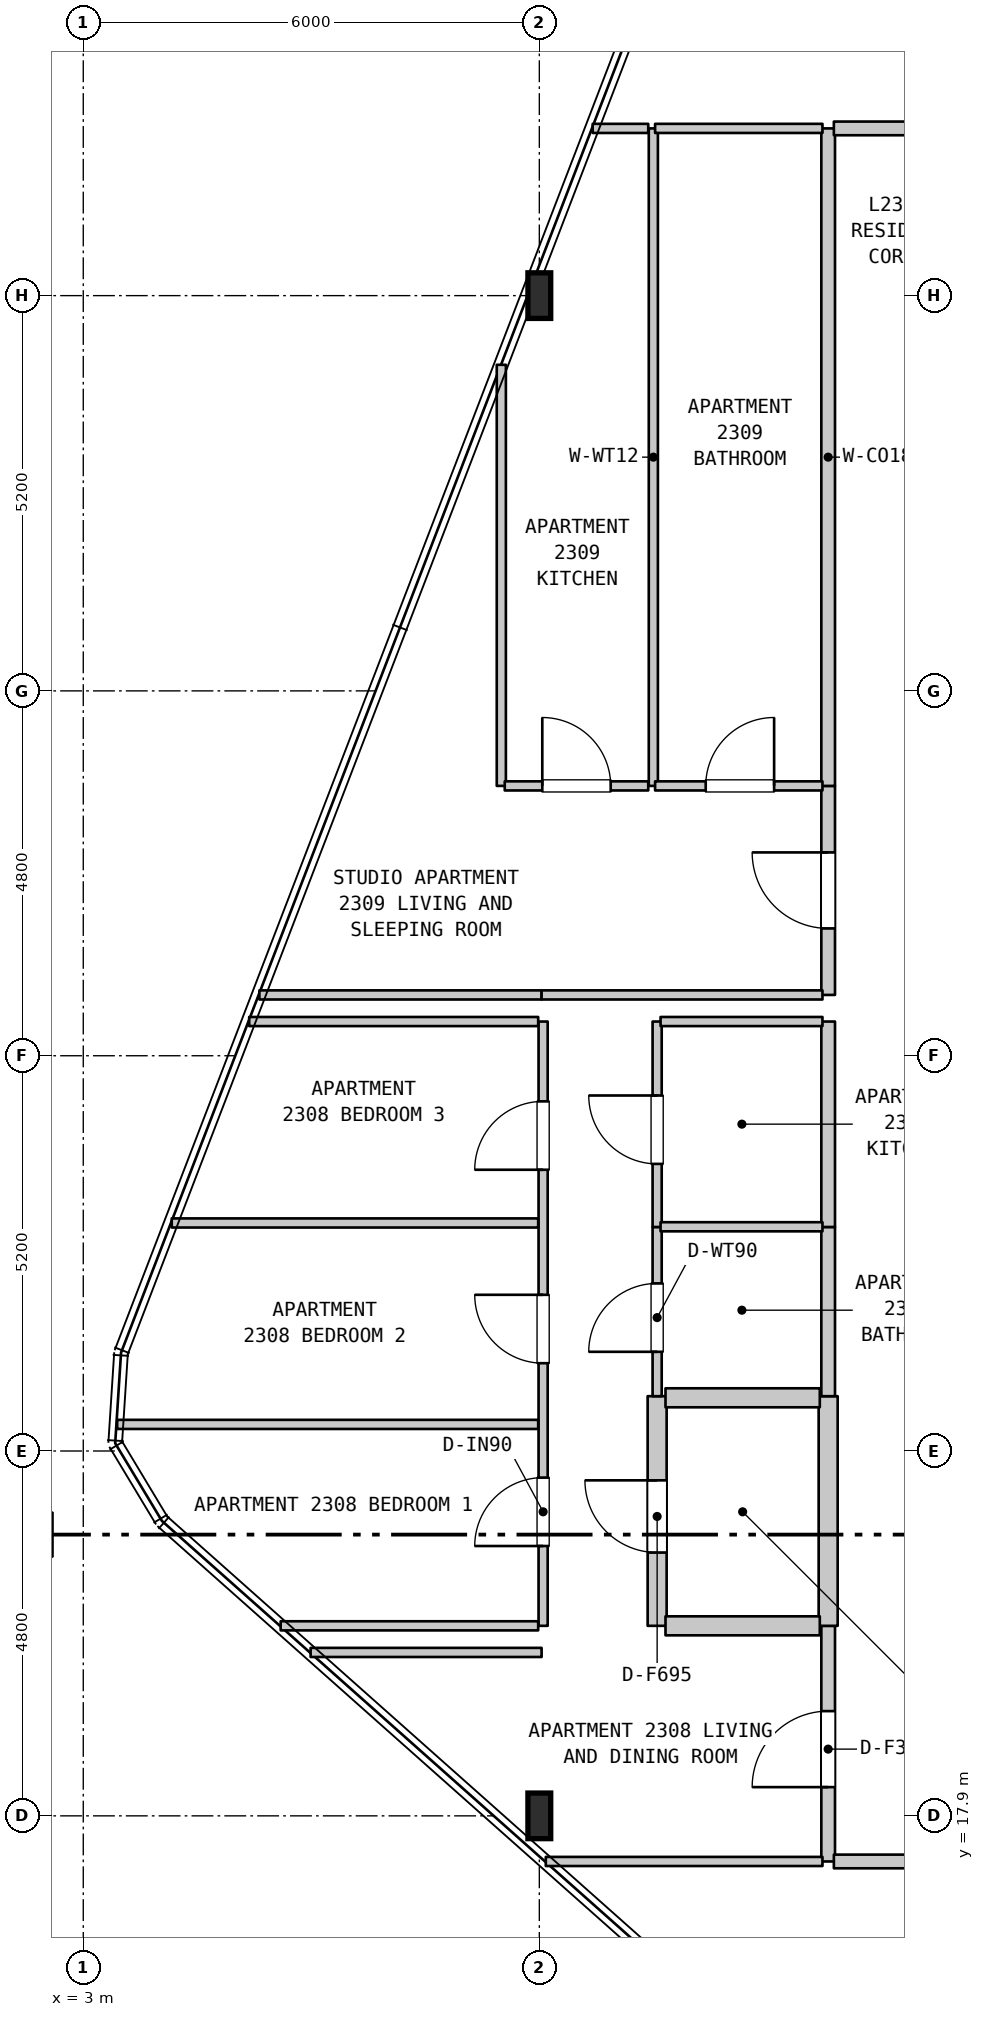
"""IFC4 building model, lengths in metres.
Left out: names, types, materials, properties, quantities, classifications, styles, units other than length and angle.
Written with IfcOpenShell. Run it as: python <this file> out.ifc"""

import sys

from ifc_helpers import new_model, si_unit, direction, frame, frame_2d, origin, origin_2d, place, context, subcontext, project, spatial, rectangle, i_section, extrude, element, fill, save


model = new_model("IFC4")
c1 = context("Model", 3, precision=1e-05, world=origin(), true_north=direction((0.0, 1.0)))
c2 = subcontext(c1, "Body", "Model", "MODEL_VIEW")
j1 = project(units=[si_unit("LENGTHUNIT", "METRE"), si_unit("PLANEANGLEUNIT", "RADIAN")], contexts=[c1])
p1 = place(None, origin())
s1 = spatial("IfcSite", under=j1, at=p1, CompositionType="ELEMENT")
p2 = place(p1, origin())
s2 = spatial("IfcBuilding", under=s1, at=p2, CompositionType="ELEMENT")
p3 = place(p2, frame((0.0, 0.0, 98.3)))
s3 = spatial("IfcBuildingStorey", under=s2, at=p3, CompositionType="ELEMENT", Elevation=98.3)
for number, where, z_axis, x_axis in (
    (1, (9.0, 17.9, 0.0), (0.0, 0.0, 1.0), (1.0, 0.0, 0.0)),
    (2, (9.0, 37.9, 0.0), (0.0, 0.0, 1.0), (1.0, 0.0, 0.0)),
):
    element("IfcColumn", number, at=place(p3, frame(where, z_axis=z_axis, x_axis=x_axis)), inside=s3, PredefinedType="COLUMN", context=c2, shape_type="SweptSolid", body=[
        extrude(i_section(OverallWidth=0.3, OverallDepth=0.6, WebThickness=0.015, FlangeThickness=0.03, FilletRadius=0.027, at=origin_2d()), origin(), (0.0, 0.0, 1.0), 3.7),
    ])
p4 = place(p3, frame((8.5, 31.45, 0.0), z_axis=(0.0, 0.0, 1.0), x_axis=(0.0, 1.0, 0.0)))
e3 = element("IfcWall", 3, at=p4, inside=s3, PredefinedType="PARTITIONING", context=c2, shape_type="SweptSolid", body=[
    extrude(rectangle(XDim=5.54, YDim=0.12, at=frame_2d((2.77, 0.0))), origin(), (0.0, 0.0, 1.0), 3.385),
])
p5 = place(p3, frame((9.05, 20.4, 0.0), z_axis=(0.0, 0.0, 1.0), x_axis=(0.0, 1.0, 0.0)))
e4 = element("IfcWall", 4, at=p5, inside=s3, PredefinedType="PARTITIONING", context=c2, shape_type="SweptSolid", body=[
    extrude(rectangle(XDim=7.95, YDim=0.12, at=frame_2d((3.975, 0.0))), origin(), (0.0, 0.0, 1.0), 2.785),
])
p6 = place(p5, frame((1.05, 0.0, 0.0)))
e5 = element("IfcOpeningElement", 5, at=p6, cuts=e4, PredefinedType="OPENING", context=c2, shape_type="SweptSolid", body=[
    extrude(rectangle(XDim=0.9, YDim=2.15, at=frame_2d((0.45, 1.075))), frame((0.0, 0.07, 0.0), z_axis=(0.0, -1.0, 0.0), x_axis=(1.0, 0.0, 0.0)), (0.0, 0.0, 1.0), 0.14),
])
p7 = place(p5, frame((3.455, 0.0, 0.0)))
e6 = element("IfcOpeningElement", 6, at=p7, cuts=e4, PredefinedType="OPENING", context=c2, shape_type="SweptSolid", body=[
    extrude(rectangle(XDim=0.9, YDim=2.15, at=frame_2d((0.45, 1.075))), frame((0.0, 0.07, 0.0), z_axis=(0.0, -1.0, 0.0), x_axis=(1.0, 0.0, 0.0)), (0.0, 0.0, 1.0), 0.14),
])
p8 = place(p5, frame((6.0, 0.0, 0.0)))
e7 = element("IfcOpeningElement", 7, at=p8, cuts=e4, PredefinedType="OPENING", context=c2, shape_type="SweptSolid", body=[
    extrude(rectangle(XDim=0.9, YDim=2.15, at=frame_2d((0.45, 1.075))), frame((0.0, 0.07, 0.0), z_axis=(0.0, -1.0, 0.0), x_axis=(1.0, 0.0, 0.0)), (0.0, 0.0, 1.0), 0.14),
])
p9 = place(p3, frame((10.5, 31.45, 0.0), z_axis=(0.0, 0.0, 1.0), x_axis=(0.0, 1.0, 0.0)))
e8 = element("IfcWall", 8, at=p9, inside=s3, PredefinedType="PARTITIONING", context=c2, shape_type="SweptSolid", body=[
    extrude(rectangle(XDim=8.65, YDim=0.12, at=frame_2d((4.325, 0.0))), origin(), (0.0, 0.0, 1.0), 3.385),
])
p10 = place(p3, frame((10.55, 20.4, 0.0), z_axis=(0.0, 0.0, 1.0), x_axis=(0.0, 1.0, 0.0)))
e9 = element("IfcWall", 9, at=p10, inside=s3, PredefinedType="STANDARD", context=c2, shape_type="SweptSolid", body=[
    extrude(rectangle(XDim=3.021, YDim=0.25, at=frame_2d((1.51, 0.0))), origin(), (0.0, 0.0, 1.0), 3.385),
])
p11 = place(p10, frame((0.964, 0.0, 0.0)))
e10 = element("IfcOpeningElement", 10, at=p11, cuts=e9, PredefinedType="OPENING", context=c2, shape_type="SweptSolid", body=[
    extrude(rectangle(XDim=0.95, YDim=2.15, at=frame_2d((0.475, 1.075))), frame((0.0, 0.135, 0.0), z_axis=(0.0, -1.0, 0.0), x_axis=(1.0, 0.0, 0.0)), (0.0, 0.0, 1.0), 0.27),
])
p12 = place(p3, frame((10.55, 23.421, 0.0), z_axis=(0.0, 0.0, 1.0), x_axis=(0.0, 1.0, 0.0)))
e11 = element("IfcWall", 11, at=p12, inside=s3, PredefinedType="PARTITIONING", context=c2, shape_type="SweptSolid", body=[
    extrude(rectangle(XDim=2.226, YDim=0.12, at=frame_2d((1.113, 0.0))), origin(), (0.0, 0.0, 1.0), 3.385),
])
p13 = place(p12, frame((0.584, 0.0, 0.0)))
e12 = element("IfcOpeningElement", 12, at=p13, cuts=e11, PredefinedType="OPENING", context=c2, shape_type="SweptSolid", body=[
    extrude(rectangle(XDim=0.9, YDim=2.1, at=frame_2d((0.45, 1.05))), frame((0.0, 0.07, 0.0), z_axis=(0.0, -1.0, 0.0), x_axis=(1.0, 0.0, 0.0)), (0.0, 0.0, 1.0), 0.14),
])
p14 = place(p3, frame((10.55, 25.647, 0.0), z_axis=(0.0, 0.0, 1.0), x_axis=(0.0, 1.0, 0.0)))
e13 = element("IfcWall", 13, at=p14, inside=s3, PredefinedType="PARTITIONING", context=c2, shape_type="SweptSolid", body=[
    extrude(rectangle(XDim=2.703, YDim=0.12, at=frame_2d((1.352, 0.0))), origin(), (0.0, 0.0, 1.0), 3.385),
])
p15 = place(p14, frame((0.83, 0.0, 0.0)))
e14 = element("IfcOpeningElement", 14, at=p15, cuts=e13, PredefinedType="OPENING", context=c2, shape_type="SweptSolid", body=[
    extrude(rectangle(XDim=0.9, YDim=2.15, at=frame_2d((0.45, 1.075))), frame((0.0, 0.07, 0.0), z_axis=(0.0, -1.0, 0.0), x_axis=(1.0, 0.0, 0.0)), (0.0, 0.0, 1.0), 0.14),
])
p16 = place(p3, frame((12.8, 17.3, 0.0), z_axis=(0.0, 0.0, 1.0), x_axis=(0.0, 1.0, 0.0)))
e15 = element("IfcWall", 15, at=p16, inside=s3, PredefinedType="STANDARD", context=c2, shape_type="SweptSolid", body=[
    extrude(rectangle(XDim=3.1, YDim=0.18, at=frame_2d((1.55, 0.0))), origin(), (0.0, 0.0, 1.0), 3.385),
])
p17 = place(p16, frame((0.978, 0.0, 0.0)))
e16 = element("IfcOpeningElement", 16, at=p17, cuts=e15, PredefinedType="OPENING", context=c2, shape_type="SweptSolid", body=[
    extrude(rectangle(XDim=1.0, YDim=2.15, at=frame_2d((0.5, 1.075))), frame((0.0, 0.1, 0.0), z_axis=(0.0, -1.0, 0.0), x_axis=(1.0, 0.0, 0.0)), (0.0, 0.0, 1.0), 0.2),
])
p18 = place(p3, frame((12.8, 20.4, 0.0), z_axis=(0.0, 0.0, 1.0), x_axis=(0.0, 1.0, 0.0)))
e17 = element("IfcWall", 17, at=p18, inside=s3, PredefinedType="STANDARD", context=c2, shape_type="SweptSolid", body=[
    extrude(rectangle(XDim=3.021, YDim=0.25, at=frame_2d((1.51, 0.0))), origin(), (0.0, 0.0, 1.0), 3.385),
])
p19 = place(p3, frame((12.8, 23.421, 0.0), z_axis=(0.0, 0.0, 1.0), x_axis=(0.0, 1.0, 0.0)))
e18 = element("IfcWall", 18, at=p19, inside=s3, PredefinedType="STANDARD", context=c2, shape_type="SweptSolid", body=[
    extrude(rectangle(XDim=2.226, YDim=0.18, at=frame_2d((1.113, 0.0))), origin(), (0.0, 0.0, 1.0), 3.385),
])
p20 = place(p3, frame((12.8, 25.647, 0.0), z_axis=(0.0, 0.0, 1.0), x_axis=(0.0, 1.0, 0.0)))
e19 = element("IfcWall", 19, at=p20, inside=s3, PredefinedType="STANDARD", context=c2, shape_type="SweptSolid", body=[
    extrude(rectangle(XDim=2.703, YDim=0.18, at=frame_2d((1.352, 0.0))), origin(), (0.0, 0.0, 1.0), 3.385),
])
p21 = place(p3, frame((12.8, 28.7, 0.0), z_axis=(0.0, 0.0, 1.0), x_axis=(0.0, 1.0, 0.0)))
e20 = element("IfcWall", 20, at=p21, inside=s3, PredefinedType="STANDARD", context=c2, shape_type="SweptSolid", body=[
    extrude(rectangle(XDim=2.75, YDim=0.18, at=frame_2d((1.375, 0.0))), origin(), (0.0, 0.0, 1.0), 3.385),
])
p22 = place(p21, frame((0.875, 0.0, 0.0)))
e21 = element("IfcOpeningElement", 21, at=p22, cuts=e20, PredefinedType="OPENING", context=c2, shape_type="SweptSolid", body=[
    extrude(rectangle(XDim=1.0, YDim=2.15, at=frame_2d((0.5, 1.075))), frame((0.0, 0.1, 0.0), z_axis=(0.0, -1.0, 0.0), x_axis=(1.0, 0.0, 0.0)), (0.0, 0.0, 1.0), 0.2),
])
p23 = place(p3, frame((12.8, 31.45, 0.0), z_axis=(0.0, 0.0, 1.0), x_axis=(0.0, 1.0, 0.0)))
e22 = element("IfcWall", 22, at=p23, inside=s3, PredefinedType="STANDARD", context=c2, shape_type="SweptSolid", body=[
    extrude(rectangle(XDim=8.65, YDim=0.18, at=frame_2d((4.325, 0.0))), origin(), (0.0, 0.0, 1.0), 3.385),
])
p24 = place(p3, frame((9.085, 17.3, 0.0), z_axis=(0.0, 0.0, 1.0), x_axis=(1.0, 0.0, 0.0)))
e23 = element("IfcWall", 23, at=p24, inside=s3, PredefinedType="PARTITIONING", context=c2, shape_type="SweptSolid", body=[
    extrude(rectangle(XDim=3.64, YDim=0.12, at=frame_2d((1.82, 0.0))), origin(), (0.0, 0.0, 1.0), 3.385),
])
p25 = place(p3, frame((12.875, 17.3, 0.0), z_axis=(0.0, 0.0, 1.0), x_axis=(1.0, 0.0, 0.0)))
e24 = element("IfcWall", 24, at=p25, inside=s3, PredefinedType="STANDARD", context=c2, shape_type="SweptSolid", body=[
    extrude(rectangle(XDim=7.35, YDim=0.18, at=frame_2d((3.675, 0.0))), origin(), (0.0, 0.0, 1.0), 3.385),
])
p26 = place(p25, frame((3.16, 0.0, 0.0)))
e25 = element("IfcOpeningElement", 25, at=p26, cuts=e24, PredefinedType="OPENING", context=c2, shape_type="SweptSolid", body=[
    extrude(rectangle(XDim=1.0, YDim=2.15, at=frame_2d((0.5, 1.075))), frame((0.0, 0.1, 0.0), z_axis=(0.0, -1.0, 0.0), x_axis=(1.0, 0.0, 0.0)), (0.0, 0.0, 1.0), 0.2),
])
p27 = place(p3, frame((5.991, 20.05, 0.0), z_axis=(0.0, 0.0, 1.0), x_axis=(1.0, 0.0, 0.0)))
e26 = element("IfcWall", 26, at=p27, inside=s3, PredefinedType="PARTITIONING", context=c2, shape_type="SweptSolid", body=[
    extrude(rectangle(XDim=3.039, YDim=0.12, at=frame_2d((1.52, 0.0))), origin(), (0.0, 0.0, 1.0), 3.385),
])
p28 = place(p3, frame((5.597, 20.4, 0.0), z_axis=(0.0, 0.0, 1.0), x_axis=(1.0, 0.0, 0.0)))
e27 = element("IfcWall", 27, at=p28, inside=s3, PredefinedType="PARTITIONING", context=c2, shape_type="SweptSolid", body=[
    extrude(rectangle(XDim=3.388, YDim=0.12, at=frame_2d((1.694, 0.0))), origin(), (0.0, 0.0, 1.0), 3.385),
])
p29 = place(p3, frame((10.66, 20.4, 0.0), z_axis=(0.0, 0.0, 1.0), x_axis=(1.0, 0.0, 0.0)))
e28 = element("IfcWall", 28, at=p29, inside=s3, PredefinedType="STANDARD", context=c2, shape_type="SweptSolid", body=[
    extrude(rectangle(XDim=2.03, YDim=0.25, at=frame_2d((1.015, 0.0))), origin(), (0.0, 0.0, 1.0), 3.385),
])
p30 = place(p3, frame((3.446, 23.05, 0.0), z_axis=(0.0, 0.0, 1.0), x_axis=(1.0, 0.0, 0.0)))
e29 = element("IfcWall", 29, at=p30, inside=s3, PredefinedType="PARTITIONING", context=c2, shape_type="SweptSolid", body=[
    extrude(rectangle(XDim=5.539, YDim=0.12, at=frame_2d((2.77, 0.0))), origin(), (0.0, 0.0, 1.0), 3.385),
])
p31 = place(p3, frame((10.66, 23.4, 0.0), z_axis=(0.0, 0.0, 1.0), x_axis=(1.0, 0.0, 0.0)))
e30 = element("IfcWall", 30, at=p31, inside=s3, PredefinedType="STANDARD", context=c2, shape_type="SweptSolid", body=[
    extrude(rectangle(XDim=2.03, YDim=0.25, at=frame_2d((1.015, 0.0))), origin(), (0.0, 0.0, 1.0), 3.385),
])
p32 = place(p3, frame((10.595, 25.65, 0.0), z_axis=(0.0, 0.0, 1.0), x_axis=(1.0, 0.0, 0.0)))
e31 = element("IfcWall", 31, at=p32, inside=s3, PredefinedType="PARTITIONING", context=c2, shape_type="SweptSolid", body=[
    extrude(rectangle(XDim=2.13, YDim=0.12, at=frame_2d((1.065, 0.0))), origin(), (0.0, 0.0, 1.0), 3.385),
])
p33 = place(p3, frame((4.164, 25.7, 0.0), z_axis=(0.0, 0.0, 1.0), x_axis=(1.0, 0.0, 0.0)))
e32 = element("IfcWall", 32, at=p33, inside=s3, PredefinedType="PARTITIONING", context=c2, shape_type="SweptSolid", body=[
    extrude(rectangle(XDim=4.821, YDim=0.12, at=frame_2d((2.411, 0.0))), origin(), (0.0, 0.0, 1.0), 3.385),
])
p34 = place(p3, frame((5.183, 28.35, 0.0), z_axis=(0.0, 0.0, 1.0), x_axis=(1.0, 0.0, 0.0)))
e33 = element("IfcWall", 33, at=p34, inside=s3, PredefinedType="PARTITIONING", context=c2, shape_type="SweptSolid", body=[
    extrude(rectangle(XDim=3.802, YDim=0.12, at=frame_2d((1.901, 0.0))), origin(), (0.0, 0.0, 1.0), 3.385),
])
p35 = place(p3, frame((10.595, 28.35, 0.0), z_axis=(0.0, 0.0, 1.0), x_axis=(1.0, 0.0, 0.0)))
e34 = element("IfcWall", 34, at=p35, inside=s3, PredefinedType="PARTITIONING", context=c2, shape_type="SweptSolid", body=[
    extrude(rectangle(XDim=2.13, YDim=0.12, at=frame_2d((1.065, 0.0))), origin(), (0.0, 0.0, 1.0), 3.385),
])
p36 = place(p3, frame((5.317, 28.7, 0.0), z_axis=(0.0, 0.0, 1.0), x_axis=(1.0, 0.0, 0.0)))
e35 = element("IfcWall", 35, at=p36, inside=s3, PredefinedType="PARTITIONING", context=c2, shape_type="SweptSolid", body=[
    extrude(rectangle(XDim=3.713, YDim=0.12, at=frame_2d((1.856, 0.0))), origin(), (0.0, 0.0, 1.0), 3.385),
])
p37 = place(p3, frame((9.03, 28.7, 0.0), z_axis=(0.0, 0.0, 1.0), x_axis=(1.0, 0.0, 0.0)))
e36 = element("IfcWall", 36, at=p37, inside=s3, PredefinedType="PARTITIONING", context=c2, shape_type="SweptSolid", body=[
    extrude(rectangle(XDim=3.695, YDim=0.12, at=frame_2d((1.848, 0.0))), origin(), (0.0, 0.0, 1.0), 3.385),
])
p38 = place(p3, frame((8.545, 31.45, 0.0), z_axis=(0.0, 0.0, 1.0), x_axis=(1.0, 0.0, 0.0)))
e37 = element("IfcWall", 37, at=p38, inside=s3, PredefinedType="PARTITIONING", context=c2, shape_type="SweptSolid", body=[
    extrude(rectangle(XDim=1.888, YDim=0.12, at=frame_2d((0.944, 0.0))), origin(), (0.0, 0.0, 1.0), 3.385),
])
p39 = place(p38, frame((0.494, 0.0, 0.0)))
e38 = element("IfcOpeningElement", 38, at=p39, cuts=e37, PredefinedType="OPENING", context=c2, shape_type="SweptSolid", body=[
    extrude(rectangle(XDim=0.9, YDim=2.15, at=frame_2d((0.45, 1.075))), frame((0.0, 0.07, 0.0), z_axis=(0.0, -1.0, 0.0), x_axis=(1.0, 0.0, 0.0)), (0.0, 0.0, 1.0), 0.14),
])
p40 = place(p3, frame((10.523, 31.45, 0.0), z_axis=(0.0, 0.0, 1.0), x_axis=(1.0, 0.0, 0.0)))
e39 = element("IfcWall", 39, at=p40, inside=s3, PredefinedType="PARTITIONING", context=c2, shape_type="SweptSolid", body=[
    extrude(rectangle(XDim=2.202, YDim=0.12, at=frame_2d((1.101, 0.0))), origin(), (0.0, 0.0, 1.0), 3.385),
])
p41 = place(p40, frame((0.666, 0.0, 0.0)))
e40 = element("IfcOpeningElement", 40, at=p41, cuts=e39, PredefinedType="OPENING", context=c2, shape_type="SweptSolid", body=[
    extrude(rectangle(XDim=0.9, YDim=2.1, at=frame_2d((0.45, 1.05))), frame((0.0, 0.07, 0.0), z_axis=(0.0, -1.0, 0.0), x_axis=(1.0, 0.0, 0.0)), (0.0, 0.0, 1.0), 0.14),
])
p42 = place(p3, frame((9.702, 40.1, 0.0), z_axis=(0.0, 0.0, 1.0), x_axis=(1.0, 0.0, 0.0)))
e41 = element("IfcWall", 41, at=p42, inside=s3, PredefinedType="PARTITIONING", context=c2, shape_type="SweptSolid", body=[
    extrude(rectangle(XDim=0.731, YDim=0.12, at=frame_2d((0.366, 0.0))), origin(), (0.0, 0.0, 1.0), 3.385),
])
p43 = place(p3, frame((10.523, 40.1, 0.0), z_axis=(0.0, 0.0, 1.0), x_axis=(1.0, 0.0, 0.0)))
e42 = element("IfcWall", 42, at=p43, inside=s3, PredefinedType="PARTITIONING", context=c2, shape_type="SweptSolid", body=[
    extrude(rectangle(XDim=2.202, YDim=0.12, at=frame_2d((1.101, 0.0))), origin(), (0.0, 0.0, 1.0), 3.385),
])
p44 = place(p3, frame((12.875, 40.1, 0.0), z_axis=(0.0, 0.0, 1.0), x_axis=(1.0, 0.0, 0.0)))
e43 = element("IfcWall", 43, at=p44, inside=s3, PredefinedType="STANDARD", context=c2, shape_type="SweptSolid", body=[
    extrude(rectangle(XDim=1.83, YDim=0.18, at=frame_2d((0.915, 0.0))), origin(), (0.0, 0.0, 1.0), 3.385),
])
p45 = place(p6, origin())
e44 = element("IfcDoor", 44, at=p45, inside=s3, OperationType="SINGLE_SWING_LEFT", PredefinedType="DOOR", context=c2, shape_type="SweptSolid", body=[
    extrude(rectangle(XDim=0.9, YDim=2.15, at=frame_2d((0.45, 1.075))), frame((0.0, 0.025, 0.0), z_axis=(0.0, -1.0, 0.0), x_axis=(1.0, 0.0, 0.0)), (0.0, 0.0, 1.0), 0.05),
])
fill(e5, e44)
p46 = place(p7, origin())
e45 = element("IfcDoor", 45, at=p46, inside=s3, OperationType="SINGLE_SWING_RIGHT", PredefinedType="DOOR", context=c2, shape_type="SweptSolid", body=[
    extrude(rectangle(XDim=0.9, YDim=2.15, at=frame_2d((0.45, 1.075))), frame((0.0, 0.025, 0.0), z_axis=(0.0, -1.0, 0.0), x_axis=(1.0, 0.0, 0.0)), (0.0, 0.0, 1.0), 0.05),
])
fill(e6, e45)
p47 = place(p8, origin())
e46 = element("IfcDoor", 46, at=p47, inside=s3, OperationType="SINGLE_SWING_LEFT", PredefinedType="DOOR", context=c2, shape_type="SweptSolid", body=[
    extrude(rectangle(XDim=0.9, YDim=2.15, at=frame_2d((0.45, 1.075))), frame((0.0, 0.025, 0.0), z_axis=(0.0, -1.0, 0.0), x_axis=(1.0, 0.0, 0.0)), (0.0, 0.0, 1.0), 0.05),
])
fill(e7, e46)
p48 = place(p11, origin())
e47 = element("IfcDoor", 47, at=p48, inside=s3, OperationType="SINGLE_SWING_RIGHT", PredefinedType="DOOR", context=c2, shape_type="SweptSolid", body=[
    extrude(rectangle(XDim=0.95, YDim=2.15, at=frame_2d((0.475, 1.075))), frame((0.0, 0.025, 0.0), z_axis=(0.0, -1.0, 0.0), x_axis=(1.0, 0.0, 0.0)), (0.0, 0.0, 1.0), 0.05),
])
fill(e10, e47)
p49 = place(p13, origin())
e48 = element("IfcDoor", 48, at=p49, inside=s3, OperationType="SINGLE_SWING_LEFT", PredefinedType="DOOR", context=c2, shape_type="SweptSolid", body=[
    extrude(rectangle(XDim=0.9, YDim=2.1, at=frame_2d((0.45, 1.05))), frame((0.0, 0.025, 0.0), z_axis=(0.0, -1.0, 0.0), x_axis=(1.0, 0.0, 0.0)), (0.0, 0.0, 1.0), 0.05),
])
fill(e12, e48)
p50 = place(p15, origin())
e49 = element("IfcDoor", 49, at=p50, inside=s3, OperationType="SINGLE_SWING_RIGHT", PredefinedType="DOOR", context=c2, shape_type="SweptSolid", body=[
    extrude(rectangle(XDim=0.9, YDim=2.15, at=frame_2d((0.45, 1.075))), frame((0.0, 0.025, 0.0), z_axis=(0.0, -1.0, 0.0), x_axis=(1.0, 0.0, 0.0)), (0.0, 0.0, 1.0), 0.05),
])
fill(e14, e49)
p51 = place(p17, origin())
e50 = element("IfcDoor", 50, at=p51, inside=s3, OperationType="SINGLE_SWING_LEFT", PredefinedType="DOOR", context=c2, shape_type="SweptSolid", body=[
    extrude(rectangle(XDim=1.0, YDim=2.15, at=frame_2d((0.5, 1.075))), frame((0.0, 0.025, 0.0), z_axis=(0.0, -1.0, 0.0), x_axis=(1.0, 0.0, 0.0)), (0.0, 0.0, 1.0), 0.05),
])
fill(e16, e50)
p52 = place(p22, origin())
e51 = element("IfcDoor", 51, at=p52, inside=s3, OperationType="SINGLE_SWING_RIGHT", PredefinedType="DOOR", context=c2, shape_type="SweptSolid", body=[
    extrude(rectangle(XDim=1.0, YDim=2.15, at=frame_2d((0.5, 1.075))), frame((0.0, 0.025, 0.0), z_axis=(0.0, -1.0, 0.0), x_axis=(1.0, 0.0, 0.0)), (0.0, 0.0, 1.0), 0.05),
])
fill(e21, e51)
p53 = place(p39, origin())
e52 = element("IfcDoor", 52, at=p53, inside=s3, OperationType="SINGLE_SWING_LEFT", PredefinedType="DOOR", context=c2, shape_type="SweptSolid", body=[
    extrude(rectangle(XDim=0.9, YDim=2.15, at=frame_2d((0.45, 1.075))), frame((0.0, 0.025, 0.0), z_axis=(0.0, -1.0, 0.0), x_axis=(1.0, 0.0, 0.0)), (0.0, 0.0, 1.0), 0.05),
])
fill(e38, e52)
p54 = place(p41, origin())
e53 = element("IfcDoor", 53, at=p54, inside=s3, OperationType="SINGLE_SWING_RIGHT", PredefinedType="DOOR", context=c2, shape_type="SweptSolid", body=[
    extrude(rectangle(XDim=0.9, YDim=2.1, at=frame_2d((0.45, 1.05))), frame((0.0, 0.025, 0.0), z_axis=(0.0, -1.0, 0.0), x_axis=(1.0, 0.0, 0.0)), (0.0, 0.0, 1.0), 0.05),
])
fill(e40, e53)
save(model, sys.argv[1])
